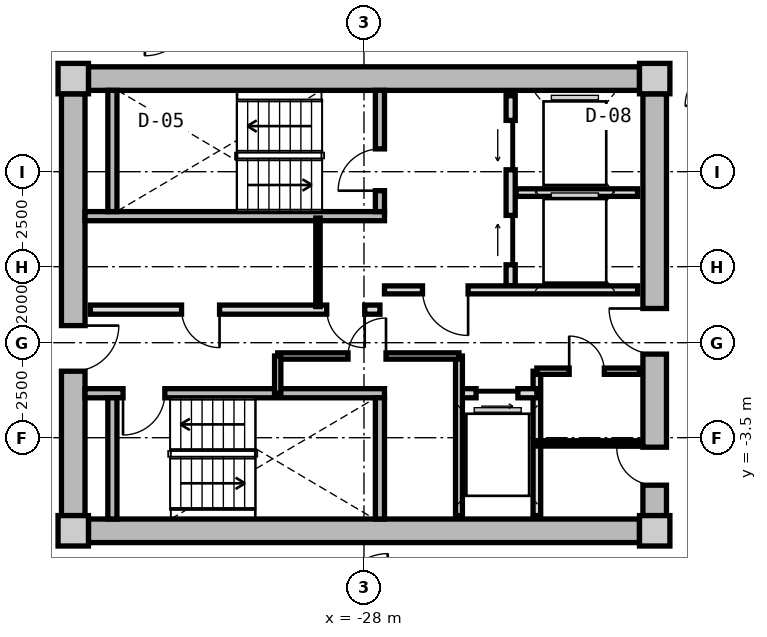
"""IFC4 building model, lengths in metres.
Left out: names, types, materials, properties, quantities, classifications, styles, units other than length and angle.
Written with IfcOpenShell. Run it as: python <this file> out.ifc"""

import sys

from ifc_helpers import new_model, si_unit, direction, frame, frame_2d, origin, origin_2d, place, context, subcontext, project, spatial, rectangle, extrude, source, transform, mapped, element, fill, save


model = new_model("IFC4")
c1 = context("Model", 3, precision=1e-05, world=origin(), true_north=direction((0.0, 1.0)))
c2 = subcontext(c1, "Body", "Model", "MODEL_VIEW")
j1 = project(units=[si_unit("LENGTHUNIT", "METRE"), si_unit("PLANEANGLEUNIT", "RADIAN")], contexts=[c1])
p1 = place(None, origin())
s1 = spatial("IfcSite", under=j1, at=p1, CompositionType="ELEMENT")
p2 = place(p1, origin())
s2 = spatial("IfcBuilding", under=s1, at=p2, CompositionType="ELEMENT")
p3 = place(p2, frame((0.0, 0.0, 170.9)))
s3 = spatial("IfcBuildingStorey", under=s2, at=p3, CompositionType="ELEMENT", Elevation=170.9)
m1 = source(origin(), c2, "Body", "SweptSolid", [
    extrude(rectangle(XDim=0.8, YDim=0.8, at=origin_2d()), origin(), (0.0, 0.0, 1.0), 3.05),
])
for number, where, z_axis, x_axis in (
    (1, (-35.65, -5.95, 0.0), (0.0, 0.0, 1.0), (1.0, 0.0, 0.0)),
    (2, (-20.35, -5.95, 0.0), (0.0, 0.0, 1.0), (1.0, 0.0, 0.0)),
    (3, (-20.35, 5.95, 0.0), (0.0, 0.0, 1.0), (1.0, 0.0, 0.0)),
    (4, (-35.65, 5.95, 0.0), (0.0, 0.0, 1.0), (1.0, 0.0, 0.0)),
):
    element("IfcColumn", number, at=place(p3, frame(where, z_axis=z_axis, x_axis=x_axis)), inside=s3, PredefinedType="COLUMN", context=c2, shape_type="MappedRepresentation", body=[
        mapped(m1, transform((0.0, 0.0, 0.0), x_axis=(1.0, 0.0, 0.0), y_axis=(0.0, 1.0, 0.0), z_axis=(0.0, 0.0, 1.0), scale=1.0)),
    ])
m2 = source(origin(), c2, "Body", "SweptSolid", [
    extrude(rectangle(XDim=14.5, YDim=0.62, at=frame_2d((7.25, 0.0))), origin(), (0.0, 0.0, 1.0), 2.81),
])
for number, where, z_axis, x_axis in (
    (5, (-35.25, 5.95, 0.0), (0.0, 0.0, 1.0), (1.0, 0.0, 0.0)),
    (6, (-20.75, -5.95, 0.0), (0.0, 0.0, 1.0), (-1.0, 0.0, 0.0)),
):
    element("IfcWall", number, at=place(p3, frame(where, z_axis=z_axis, x_axis=x_axis)), inside=s3, PredefinedType="SHEAR", context=c2, shape_type="MappedRepresentation", body=[
        mapped(m2, transform((0.0, 0.0, 0.0), x_axis=(1.0, 0.0, 0.0), y_axis=(0.0, 1.0, 0.0), z_axis=(0.0, 0.0, 1.0), scale=1.0)),
    ])
m3 = source(origin(), c2, "Body", "SweptSolid", [
    extrude(rectangle(XDim=11.1, YDim=0.62, at=frame_2d((5.55, 0.0))), origin(), (0.0, 0.0, 1.0), 2.81),
])
p4 = place(p3, frame((-35.65, -5.55, 0.0), z_axis=(0.0, 0.0, 1.0), x_axis=(0.0, 1.0, 0.0)))
e7 = element("IfcWall", 7, at=p4, inside=s3, PredefinedType="SHEAR", context=c2, shape_type="MappedRepresentation", body=[
    mapped(m3, transform((0.0, 0.0, 0.0), x_axis=(1.0, 0.0, 0.0), y_axis=(0.0, 1.0, 0.0), z_axis=(0.0, 0.0, 1.0), scale=1.0)),
])
p5 = place(p4, frame((3.8, 0.0, 0.0)))
e8 = element("IfcOpeningElement", 8, at=p5, cuts=e7, PredefinedType="OPENING", context=c2, shape_type="SweptSolid", body=[
    extrude(rectangle(XDim=1.2, YDim=2.15, at=frame_2d((0.6, 1.075))), frame((0.0, 0.32, 0.0), z_axis=(0.0, -1.0, 0.0), x_axis=(1.0, 0.0, 0.0)), (0.0, 0.0, 1.0), 0.64),
])
p6 = place(p3, frame((-20.35, 5.55, 0.0), z_axis=(0.0, 0.0, 1.0), x_axis=(0.0, -1.0, 0.0)))
e9 = element("IfcWall", 9, at=p6, inside=s3, PredefinedType="SHEAR", context=c2, shape_type="MappedRepresentation", body=[
    mapped(m3, transform((0.0, 0.0, 0.0), x_axis=(1.0, 0.0, 0.0), y_axis=(0.0, 1.0, 0.0), z_axis=(0.0, 0.0, 1.0), scale=1.0)),
])
p7 = place(p6, frame((5.65, 0.0, 0.0)))
e10 = element("IfcOpeningElement", 10, at=p7, cuts=e9, PredefinedType="OPENING", context=c2, shape_type="SweptSolid", body=[
    extrude(rectangle(XDim=1.2, YDim=2.15, at=frame_2d((0.6, 1.075))), frame((0.0, 0.32, 0.0), z_axis=(0.0, -1.0, 0.0), x_axis=(1.0, 0.0, 0.0)), (0.0, 0.0, 1.0), 0.64),
])
p8 = place(p6, frame((9.3, 0.0, 0.0)))
e11 = element("IfcOpeningElement", 11, at=p8, cuts=e9, PredefinedType="OPENING", context=c2, shape_type="SweptSolid", body=[
    extrude(rectangle(XDim=1.0, YDim=2.1, at=frame_2d((0.5, 1.05))), frame((0.0, 0.32, 0.0), z_axis=(0.0, -1.0, 0.0), x_axis=(1.0, 0.0, 0.0)), (0.0, 0.0, 1.0), 0.64),
])
m4 = source(origin(), c2, "Body", "SweptSolid", [
    extrude(rectangle(XDim=7.88, YDim=0.24, at=frame_2d((3.94, 0.0))), origin(), (0.0, 0.0, 1.0), 2.81),
])
p9 = place(p3, frame((-35.34, 2.33, 0.0), z_axis=(0.0, 0.0, 1.0), x_axis=(1.0, 0.0, 0.0)))
e12 = element("IfcWall", 12, at=p9, inside=s3, PredefinedType="PARTITIONING", context=c2, shape_type="MappedRepresentation", body=[
    mapped(m4, transform((0.0, 0.0, 0.0), x_axis=(1.0, 0.0, 0.0), y_axis=(0.0, 1.0, 0.0), z_axis=(0.0, 0.0, 1.0), scale=1.0)),
])
m5 = source(origin(), c2, "Body", "SweptSolid", [
    extrude(rectangle(XDim=3.19, YDim=0.24, at=frame_2d((1.595, 0.0))), origin(), (0.0, 0.0, 1.0), 2.81),
])
p10 = place(p3, frame((-34.62, 2.45, 0.0), z_axis=(0.0, 0.0, 1.0), x_axis=(0.0, 1.0, 0.0)))
e13 = element("IfcWall", 13, at=p10, inside=s3, PredefinedType="PARTITIONING", context=c2, shape_type="MappedRepresentation", body=[
    mapped(m5, transform((0.0, 0.0, 0.0), x_axis=(1.0, 0.0, 0.0), y_axis=(0.0, 1.0, 0.0), z_axis=(0.0, 0.0, 1.0), scale=1.0)),
])
p11 = place(p3, frame((-27.58, 2.45, 0.0), z_axis=(0.0, 0.0, 1.0), x_axis=(0.0, 1.0, 0.0)))
e14 = element("IfcWall", 14, at=p11, inside=s3, PredefinedType="PARTITIONING", context=c2, shape_type="MappedRepresentation", body=[
    mapped(m5, transform((0.0, 0.0, 0.0), x_axis=(1.0, 0.0, 0.0), y_axis=(0.0, 1.0, 0.0), z_axis=(0.0, 0.0, 1.0), scale=1.0)),
])
p12 = place(p11, frame((0.55, 0.0, 0.0)))
e15 = element("IfcOpeningElement", 15, at=p12, cuts=e14, PredefinedType="OPENING", context=c2, shape_type="SweptSolid", body=[
    extrude(rectangle(XDim=1.1, YDim=2.15, at=frame_2d((0.55, 1.075))), frame((0.0, 0.13, 0.0), z_axis=(0.0, -1.0, 0.0), x_axis=(1.0, 0.0, 0.0)), (0.0, 0.0, 1.0), 0.26),
])
p13 = place(p3, frame((-35.34, -2.33, 0.0), z_axis=(0.0, 0.0, 1.0), x_axis=(1.0, 0.0, 0.0)))
e16 = element("IfcWall", 16, at=p13, inside=s3, PredefinedType="PARTITIONING", context=c2, shape_type="MappedRepresentation", body=[
    mapped(m4, transform((0.0, 0.0, 0.0), x_axis=(1.0, 0.0, 0.0), y_axis=(0.0, 1.0, 0.0), z_axis=(0.0, 0.0, 1.0), scale=1.0)),
])
p14 = place(p13, frame((1.0, 0.0, 0.0)))
e17 = element("IfcOpeningElement", 17, at=p14, cuts=e16, PredefinedType="OPENING", context=c2, shape_type="SweptSolid", body=[
    extrude(rectangle(XDim=1.1, YDim=2.15, at=frame_2d((0.55, 1.075))), frame((0.0, 0.13, 0.0), z_axis=(0.0, -1.0, 0.0), x_axis=(1.0, 0.0, 0.0)), (0.0, 0.0, 1.0), 0.26),
])
for number, where, z_axis, x_axis in (
    (18, (-34.62, -5.64, 0.0), (0.0, 0.0, 1.0), (0.0, 1.0, 0.0)),
    (19, (-27.58, -5.64, 0.0), (0.0, 0.0, 1.0), (0.0, 1.0, 0.0)),
):
    element("IfcWall", number, at=place(p3, frame(where, z_axis=z_axis, x_axis=x_axis)), inside=s3, PredefinedType="PARTITIONING", context=c2, shape_type="MappedRepresentation", body=[
        mapped(m5, transform((0.0, 0.0, 0.0), x_axis=(1.0, 0.0, 0.0), y_axis=(0.0, 1.0, 0.0), z_axis=(0.0, 0.0, 1.0), scale=1.0)),
    ])
m6 = source(origin(), c2, "Body", "SweptSolid", [
    extrude(rectangle(XDim=5.0, YDim=0.24, at=frame_2d((2.5, 0.0))), origin(), (0.0, 0.0, 1.0), 2.795),
])
p15 = place(p3, frame((-24.14, 0.5, 0.0), z_axis=(0.0, 0.0, 1.0), x_axis=(0.0, 1.0, 0.0)))
e20 = element("IfcWall", 20, at=p15, inside=s3, PredefinedType="PARTITIONING", context=c2, shape_type="MappedRepresentation", body=[
    mapped(m6, transform((0.0, 0.0, 0.0), x_axis=(1.0, 0.0, 0.0), y_axis=(0.0, 1.0, 0.0), z_axis=(0.0, 0.0, 1.0), scale=1.0)),
])
p16 = place(p15, frame((3.05, 0.0, 0.0)))
e21 = element("IfcOpeningElement", 21, at=p16, cuts=e20, PredefinedType="OPENING", context=c2, shape_type="SweptSolid", body=[
    extrude(rectangle(XDim=1.3, YDim=2.2, at=frame_2d((0.65, 1.1))), frame((0.0, 0.13, 0.0), z_axis=(0.0, -1.0, 0.0), x_axis=(1.0, 0.0, 0.0)), (0.0, 0.0, 1.0), 0.26),
])
p17 = place(p15, frame((0.55, 0.0, 0.0)))
e22 = element("IfcOpeningElement", 22, at=p17, cuts=e20, PredefinedType="OPENING", context=c2, shape_type="SweptSolid", body=[
    extrude(rectangle(XDim=1.3, YDim=2.2, at=frame_2d((0.65, 1.1))), frame((0.0, 0.13, 0.0), z_axis=(0.0, -1.0, 0.0), x_axis=(1.0, 0.0, 0.0)), (0.0, 0.0, 1.0), 0.26),
])
m7 = source(origin(), c2, "Body", "SweptSolid", [
    extrude(rectangle(XDim=3.2, YDim=0.2, at=frame_2d((1.6, 0.0))), origin(), (0.0, 0.0, 1.0), 2.795),
])
p18 = place(p3, frame((-24.0, 2.95, 0.0), z_axis=(0.0, 0.0, 1.0), x_axis=(1.0, 0.0, 0.0)))
e23 = element("IfcWall", 23, at=p18, inside=s3, PredefinedType="PARTITIONING", context=c2, shape_type="MappedRepresentation", body=[
    mapped(m7, transform((0.0, 0.0, 0.0), x_axis=(1.0, 0.0, 0.0), y_axis=(0.0, 1.0, 0.0), z_axis=(0.0, 0.0, 1.0), scale=1.0)),
])
m8 = source(origin(), c2, "Body", "SweptSolid", [
    extrude(rectangle(XDim=6.66, YDim=0.21, at=frame_2d((3.33, 0.0))), origin(), (0.0, 0.0, 1.0), 2.795),
])
p19 = place(p3, frame((-27.46, 0.39, 0.0), z_axis=(0.0, 0.0, 1.0), x_axis=(1.0, 0.0, 0.0)))
e24 = element("IfcWall", 24, at=p19, inside=s3, PredefinedType="PARTITIONING", context=c2, shape_type="MappedRepresentation", body=[
    mapped(m8, transform((0.0, 0.0, 0.0), x_axis=(1.0, 0.0, 0.0), y_axis=(0.0, 1.0, 0.0), z_axis=(0.0, 0.0, 1.0), scale=1.0)),
])
p20 = place(p19, frame((1.0, 0.0, 0.0)))
e25 = element("IfcOpeningElement", 25, at=p20, cuts=e24, PredefinedType="OPENING", context=c2, shape_type="SweptSolid", body=[
    extrude(rectangle(XDim=1.2, YDim=2.15, at=frame_2d((0.6, 1.075))), frame((0.0, 0.115, 0.0), z_axis=(0.0, -1.0, 0.0), x_axis=(1.0, 0.0, 0.0)), (0.0, 0.0, 1.0), 0.23),
])
m9 = source(origin(), c2, "Body", "SweptSolid", [
    extrude(rectangle(XDim=7.62, YDim=0.24, at=frame_2d((3.81, 0.0))), origin(), (0.0, 0.0, 1.0), 2.795),
])
p21 = place(p3, frame((-35.2, -0.13, 0.0), z_axis=(0.0, 0.0, 1.0), x_axis=(1.0, 0.0, 0.0)))
e26 = element("IfcWall", 26, at=p21, inside=s3, PredefinedType="PARTITIONING", context=c2, shape_type="MappedRepresentation", body=[
    mapped(m9, transform((0.0, 0.0, 0.0), x_axis=(1.0, 0.0, 0.0), y_axis=(0.0, 1.0, 0.0), z_axis=(0.0, 0.0, 1.0), scale=1.0)),
])
p22 = place(p21, frame((6.22, 0.0, 0.0)))
e27 = element("IfcOpeningElement", 27, at=p22, cuts=e26, PredefinedType="OPENING", context=c2, shape_type="SweptSolid", body=[
    extrude(rectangle(XDim=1.0, YDim=2.1, at=frame_2d((0.5, 1.05))), frame((0.0, 0.13, 0.0), z_axis=(0.0, -1.0, 0.0), x_axis=(1.0, 0.0, 0.0)), (0.0, 0.0, 1.0), 0.26),
])
p23 = place(p21, frame((2.4, 0.0, 0.0)))
e28 = element("IfcOpeningElement", 28, at=p23, cuts=e26, PredefinedType="OPENING", context=c2, shape_type="SweptSolid", body=[
    extrude(rectangle(XDim=1.0, YDim=2.1, at=frame_2d((0.5, 1.05))), frame((0.0, 0.13, 0.0), z_axis=(0.0, -1.0, 0.0), x_axis=(1.0, 0.0, 0.0)), (0.0, 0.0, 1.0), 0.26),
])
m10 = source(origin(), c2, "Body", "SweptSolid", [
    extrude(rectangle(XDim=2.33, YDim=0.115, at=frame_2d((1.165, 0.0))), origin(), (0.0, 0.0, 1.0), 2.795),
])
p24 = place(p3, frame((-29.21, -0.05, 0.0), z_axis=(0.0, 0.0, 1.0), x_axis=(0.0, 1.0, 0.0)))
e29 = element("IfcWall", 29, at=p24, inside=s3, PredefinedType="PARTITIONING", context=c2, shape_type="MappedRepresentation", body=[
    mapped(m10, transform((0.0, 0.0, 0.0), x_axis=(1.0, 0.0, 0.0), y_axis=(0.0, 1.0, 0.0), z_axis=(0.0, 0.0, 1.0), scale=1.0)),
])
m11 = source(origin(), c2, "Body", "SweptSolid", [
    extrude(rectangle(XDim=3.8, YDim=0.2, at=frame_2d((1.9, 0.0))), origin(), (0.0, 0.0, 1.0), 2.795),
])
p25 = place(p3, frame((-23.45, -5.55, 0.0), z_axis=(0.0, 0.0, 1.0), x_axis=(0.0, 1.0, 0.0)))
e30 = element("IfcWall", 30, at=p25, inside=s3, PredefinedType="PARTITIONING", context=c2, shape_type="MappedRepresentation", body=[
    mapped(m11, transform((0.0, 0.0, 0.0), x_axis=(1.0, 0.0, 0.0), y_axis=(0.0, 1.0, 0.0), z_axis=(0.0, 0.0, 1.0), scale=1.0)),
])
m12 = source(origin(), c2, "Body", "SweptSolid", [
    extrude(rectangle(XDim=2.05, YDim=0.24, at=frame_2d((1.025, 0.0))), origin(), (0.0, 0.0, 1.0), 2.795),
])
p26 = place(p3, frame((-25.5, -2.33, 0.0), z_axis=(0.0, 0.0, 1.0), x_axis=(1.0, 0.0, 0.0)))
e31 = element("IfcWall", 31, at=p26, inside=s3, PredefinedType="PARTITIONING", context=c2, shape_type="MappedRepresentation", body=[
    mapped(m12, transform((0.0, 0.0, 0.0), x_axis=(1.0, 0.0, 0.0), y_axis=(0.0, 1.0, 0.0), z_axis=(0.0, 0.0, 1.0), scale=1.0)),
])
p27 = place(p26, frame((0.45, 0.0, 0.0)))
e32 = element("IfcOpeningElement", 32, at=p27, cuts=e31, PredefinedType="OPENING", context=c2, shape_type="SweptSolid", body=[
    extrude(rectangle(XDim=1.1, YDim=2.2, at=frame_2d((0.55, 1.1))), frame((0.0, 0.13, 0.0), z_axis=(0.0, -1.0, 0.0), x_axis=(1.0, 0.0, 0.0)), (0.0, 0.0, 1.0), 0.26),
])
m13 = source(origin(), c2, "Body", "SweptSolid", [
    extrude(rectangle(XDim=4.2, YDim=0.18, at=frame_2d((2.1, 0.0))), origin(), (0.0, 0.0, 1.0), 2.795),
])
p28 = place(p3, frame((-25.5, -5.55, 0.0), z_axis=(0.0, 0.0, 1.0), x_axis=(0.0, 1.0, 0.0)))
e33 = element("IfcWall", 33, at=p28, inside=s3, PredefinedType="PARTITIONING", context=c2, shape_type="MappedRepresentation", body=[
    mapped(m13, transform((0.0, 0.0, 0.0), x_axis=(1.0, 0.0, 0.0), y_axis=(0.0, 1.0, 0.0), z_axis=(0.0, 0.0, 1.0), scale=1.0)),
])
m14 = source(origin(), c2, "Body", "SweptSolid", [
    extrude(rectangle(XDim=4.77, YDim=0.165, at=frame_2d((2.385, 0.0))), origin(), (0.0, 0.0, 1.0), 2.795),
])
p29 = place(p3, frame((-30.27, -1.35, 0.0), z_axis=(0.0, 0.0, 1.0), x_axis=(1.0, 0.0, 0.0)))
e34 = element("IfcWall", 34, at=p29, inside=s3, PredefinedType="PARTITIONING", context=c2, shape_type="MappedRepresentation", body=[
    mapped(m14, transform((0.0, 0.0, 0.0), x_axis=(1.0, 0.0, 0.0), y_axis=(0.0, 1.0, 0.0), z_axis=(0.0, 0.0, 1.0), scale=1.0)),
])
p30 = place(p29, frame((1.85, 0.0, 0.0)))
e35 = element("IfcOpeningElement", 35, at=p30, cuts=e34, PredefinedType="OPENING", context=c2, shape_type="SweptSolid", body=[
    extrude(rectangle(XDim=1.0, YDim=2.1, at=frame_2d((0.5, 1.05))), frame((0.0, 0.093, 0.0), z_axis=(0.0, -1.0, 0.0), x_axis=(1.0, 0.0, 0.0)), (0.0, 0.0, 1.0), 0.185),
])
m15 = source(origin(), c2, "Body", "SweptSolid", [
    extrude(rectangle(XDim=0.98, YDim=0.165, at=frame_2d((0.49, 0.0))), origin(), (0.0, 0.0, 1.0), 2.795),
])
p31 = place(p3, frame((-30.27, -2.33, 0.0), z_axis=(0.0, 0.0, 1.0), x_axis=(0.0, 1.0, 0.0)))
e36 = element("IfcWall", 36, at=p31, inside=s3, PredefinedType="PARTITIONING", context=c2, shape_type="MappedRepresentation", body=[
    mapped(m15, transform((0.0, 0.0, 0.0), x_axis=(1.0, 0.0, 0.0), y_axis=(0.0, 1.0, 0.0), z_axis=(0.0, 0.0, 1.0), scale=1.0)),
])
m16 = source(origin(), c2, "Body", "SweptSolid", [
    extrude(rectangle(XDim=2.7, YDim=0.165, at=frame_2d((1.35, 0.0))), origin(), (0.0, 0.0, 1.0), 2.795),
])
p32 = place(p3, frame((-23.45, -1.75, 0.0), z_axis=(0.0, 0.0, 1.0), x_axis=(1.0, 0.0, 0.0)))
e37 = element("IfcWall", 37, at=p32, inside=s3, PredefinedType="PARTITIONING", context=c2, shape_type="MappedRepresentation", body=[
    mapped(m16, transform((0.0, 0.0, 0.0), x_axis=(1.0, 0.0, 0.0), y_axis=(0.0, 1.0, 0.0), z_axis=(0.0, 0.0, 1.0), scale=1.0)),
])
p33 = place(p32, frame((0.85, 0.0, 0.0)))
e38 = element("IfcOpeningElement", 38, at=p33, cuts=e37, PredefinedType="OPENING", context=c2, shape_type="SweptSolid", body=[
    extrude(rectangle(XDim=0.925, YDim=2.1, at=frame_2d((0.462, 1.05))), frame((0.0, 0.093, 0.0), z_axis=(0.0, -1.0, 0.0), x_axis=(1.0, 0.0, 0.0)), (0.0, 0.0, 1.0), 0.185),
])
m17 = source(origin(), c2, "Body", "SweptSolid", [
    extrude(rectangle(XDim=2.7, YDim=0.14, at=frame_2d((1.35, 0.0))), origin(), (0.0, 0.0, 1.0), 2.795),
])
p34 = place(p3, frame((-23.45, -3.65, 0.0), z_axis=(0.0, 0.0, 1.0), x_axis=(1.0, 0.0, 0.0)))
e39 = element("IfcWall", 39, at=p34, inside=s3, PredefinedType="PARTITIONING", context=c2, shape_type="MappedRepresentation", body=[
    mapped(m17, transform((0.0, 0.0, 0.0), x_axis=(1.0, 0.0, 0.0), y_axis=(0.0, 1.0, 0.0), z_axis=(0.0, 0.0, 1.0), scale=1.0)),
])
m18 = source(origin(), c2, "Body", "SweptSolid", [
    extrude(rectangle(XDim=1.1, YDim=2.15, at=frame_2d((0.55, 1.075))), frame((0.0, 0.025, 0.0), z_axis=(0.0, -1.0, 0.0), x_axis=(1.0, 0.0, 0.0)), (0.0, 0.0, 1.0), 0.05),
])
p35 = place(p12, origin())
e40 = element("IfcDoor", 40, at=p35, inside=s3, OperationType="SINGLE_SWING_LEFT", PredefinedType="DOOR", context=c2, shape_type="MappedRepresentation", body=[
    mapped(m18, transform((0.0, 0.0, 0.0), x_axis=(1.0, 0.0, 0.0), y_axis=(0.0, 1.0, 0.0), z_axis=(0.0, 0.0, 1.0), scale=1.0)),
])
fill(e15, e40)
p36 = place(p14, frame((1.1, 0.0, 0.0), z_axis=(0.0, 0.0, 1.0), x_axis=(-1.0, 0.0, 0.0)))
e41 = element("IfcDoor", 41, at=p36, inside=s3, OperationType="SINGLE_SWING_RIGHT", PredefinedType="DOOR", context=c2, shape_type="MappedRepresentation", body=[
    mapped(m18, transform((0.0, 0.0, 0.0), x_axis=(1.0, 0.0, 0.0), y_axis=(0.0, 1.0, 0.0), z_axis=(0.0, 0.0, 1.0), scale=1.0)),
])
fill(e17, e41)
m19 = source(origin(), c2, "Body", "SweptSolid", [
    extrude(rectangle(XDim=1.3, YDim=2.2, at=frame_2d((0.65, 1.1))), frame((0.0, 0.025, 0.0), z_axis=(0.0, -1.0, 0.0), x_axis=(1.0, 0.0, 0.0)), (0.0, 0.0, 1.0), 0.05),
])
p37 = place(p16, origin())
e42 = element("IfcDoor", 42, at=p37, inside=s3, OperationType="SLIDING_TO_LEFT", PredefinedType="DOOR", context=c2, shape_type="MappedRepresentation", body=[
    mapped(m19, transform((0.0, 0.0, 0.0), x_axis=(1.0, 0.0, 0.0), y_axis=(0.0, 1.0, 0.0), z_axis=(0.0, 0.0, 1.0), scale=1.0)),
])
fill(e21, e42)
p38 = place(p17, origin())
e43 = element("IfcDoor", 43, at=p38, inside=s3, OperationType="SLIDING_TO_RIGHT", PredefinedType="DOOR", context=c2, shape_type="MappedRepresentation", body=[
    mapped(m19, transform((0.0, 0.0, 0.0), x_axis=(1.0, 0.0, 0.0), y_axis=(0.0, 1.0, 0.0), z_axis=(0.0, 0.0, 1.0), scale=1.0)),
])
fill(e22, e43)
m20 = source(origin(), c2, "Body", "SweptSolid", [
    extrude(rectangle(XDim=1.2, YDim=2.15, at=frame_2d((0.6, 1.075))), frame((0.0, 0.025, 0.0), z_axis=(0.0, -1.0, 0.0), x_axis=(1.0, 0.0, 0.0)), (0.0, 0.0, 1.0), 0.05),
])
p39 = place(p20, frame((1.2, 0.0, 0.0), z_axis=(0.0, 0.0, 1.0), x_axis=(-1.0, 0.0, 0.0)))
e44 = element("IfcDoor", 44, at=p39, inside=s3, OperationType="SINGLE_SWING_LEFT", PredefinedType="DOOR", context=c2, shape_type="MappedRepresentation", body=[
    mapped(m20, transform((0.0, 0.0, 0.0), x_axis=(1.0, 0.0, 0.0), y_axis=(0.0, 1.0, 0.0), z_axis=(0.0, 0.0, 1.0), scale=1.0)),
])
fill(e25, e44)
p40 = place(p5, frame((1.2, 0.0, 0.0), z_axis=(0.0, 0.0, 1.0), x_axis=(-1.0, 0.0, 0.0)))
e45 = element("IfcDoor", 45, at=p40, inside=s3, OperationType="SINGLE_SWING_LEFT", PredefinedType="DOOR", context=c2, shape_type="MappedRepresentation", body=[
    mapped(m20, transform((0.0, 0.0, 0.0), x_axis=(1.0, 0.0, 0.0), y_axis=(0.0, 1.0, 0.0), z_axis=(0.0, 0.0, 1.0), scale=1.0)),
])
fill(e8, e45)
p41 = place(p7, frame((1.2, 0.0, 0.0), z_axis=(0.0, 0.0, 1.0), x_axis=(-1.0, 0.0, 0.0)))
e46 = element("IfcDoor", 46, at=p41, inside=s3, OperationType="SINGLE_SWING_RIGHT", PredefinedType="DOOR", context=c2, shape_type="MappedRepresentation", body=[
    mapped(m20, transform((0.0, 0.0, 0.0), x_axis=(1.0, 0.0, 0.0), y_axis=(0.0, 1.0, 0.0), z_axis=(0.0, 0.0, 1.0), scale=1.0)),
])
fill(e10, e46)
m21 = source(origin(), c2, "Body", "SweptSolid", [
    extrude(rectangle(XDim=1.0, YDim=2.1, at=frame_2d((0.5, 1.05))), frame((0.0, 0.025, 0.0), z_axis=(0.0, -1.0, 0.0), x_axis=(1.0, 0.0, 0.0)), (0.0, 0.0, 1.0), 0.05),
])
p42 = place(p22, frame((1.0, 0.0, 0.0), z_axis=(0.0, 0.0, 1.0), x_axis=(-1.0, 0.0, 0.0)))
e47 = element("IfcDoor", 47, at=p42, inside=s3, OperationType="SINGLE_SWING_LEFT", PredefinedType="DOOR", context=c2, shape_type="MappedRepresentation", body=[
    mapped(m21, transform((0.0, 0.0, 0.0), x_axis=(1.0, 0.0, 0.0), y_axis=(0.0, 1.0, 0.0), z_axis=(0.0, 0.0, 1.0), scale=1.0)),
])
fill(e27, e47)
p43 = place(p23, frame((1.0, 0.0, 0.0), z_axis=(0.0, 0.0, 1.0), x_axis=(-1.0, 0.0, 0.0)))
e48 = element("IfcDoor", 48, at=p43, inside=s3, OperationType="SINGLE_SWING_LEFT", PredefinedType="DOOR", context=c2, shape_type="MappedRepresentation", body=[
    mapped(m21, transform((0.0, 0.0, 0.0), x_axis=(1.0, 0.0, 0.0), y_axis=(0.0, 1.0, 0.0), z_axis=(0.0, 0.0, 1.0), scale=1.0)),
])
fill(e28, e48)
m22 = source(origin(), c2, "Body", "SweptSolid", [
    extrude(rectangle(XDim=1.1, YDim=2.2, at=frame_2d((0.55, 1.1))), frame((0.0, 0.025, 0.0), z_axis=(0.0, -1.0, 0.0), x_axis=(1.0, 0.0, 0.0)), (0.0, 0.0, 1.0), 0.05),
])
p44 = place(p27, frame((1.1, 0.0, 0.0), z_axis=(0.0, 0.0, 1.0), x_axis=(-1.0, 0.0, 0.0)))
e49 = element("IfcDoor", 49, at=p44, inside=s3, OperationType="SLIDING_TO_RIGHT", PredefinedType="DOOR", context=c2, shape_type="MappedRepresentation", body=[
    mapped(m22, transform((0.0, 0.0, 0.0), x_axis=(1.0, 0.0, 0.0), y_axis=(0.0, 1.0, 0.0), z_axis=(0.0, 0.0, 1.0), scale=1.0)),
])
fill(e32, e49)
p45 = place(p30, origin())
e50 = element("IfcDoor", 50, at=p45, inside=s3, OperationType="SINGLE_SWING_RIGHT", PredefinedType="DOOR", context=c2, shape_type="MappedRepresentation", body=[
    mapped(m21, transform((0.0, 0.0, 0.0), x_axis=(1.0, 0.0, 0.0), y_axis=(0.0, 1.0, 0.0), z_axis=(0.0, 0.0, 1.0), scale=1.0)),
])
fill(e35, e50)
m23 = source(origin(), c2, "Body", "SweptSolid", [
    extrude(rectangle(XDim=0.925, YDim=2.1, at=frame_2d((0.462, 1.05))), frame((0.0, 0.025, 0.0), z_axis=(0.0, -1.0, 0.0), x_axis=(1.0, 0.0, 0.0)), (0.0, 0.0, 1.0), 0.05),
])
p46 = place(p33, origin())
e51 = element("IfcDoor", 51, at=p46, inside=s3, OperationType="SINGLE_SWING_LEFT", PredefinedType="DOOR", context=c2, shape_type="MappedRepresentation", body=[
    mapped(m23, transform((0.0, 0.0, 0.0), x_axis=(1.0, 0.0, 0.0), y_axis=(0.0, 1.0, 0.0), z_axis=(0.0, 0.0, 1.0), scale=1.0)),
])
fill(e38, e51)
p47 = place(p8, frame((1.0, 0.0, 0.0), z_axis=(0.0, 0.0, 1.0), x_axis=(-1.0, 0.0, 0.0)))
e52 = element("IfcDoor", 52, at=p47, inside=s3, OperationType="SINGLE_SWING_RIGHT", PredefinedType="DOOR", context=c2, shape_type="MappedRepresentation", body=[
    mapped(m21, transform((0.0, 0.0, 0.0), x_axis=(1.0, 0.0, 0.0), y_axis=(0.0, 1.0, 0.0), z_axis=(0.0, 0.0, 1.0), scale=1.0)),
])
fill(e11, e52)
save(model, sys.argv[1])
